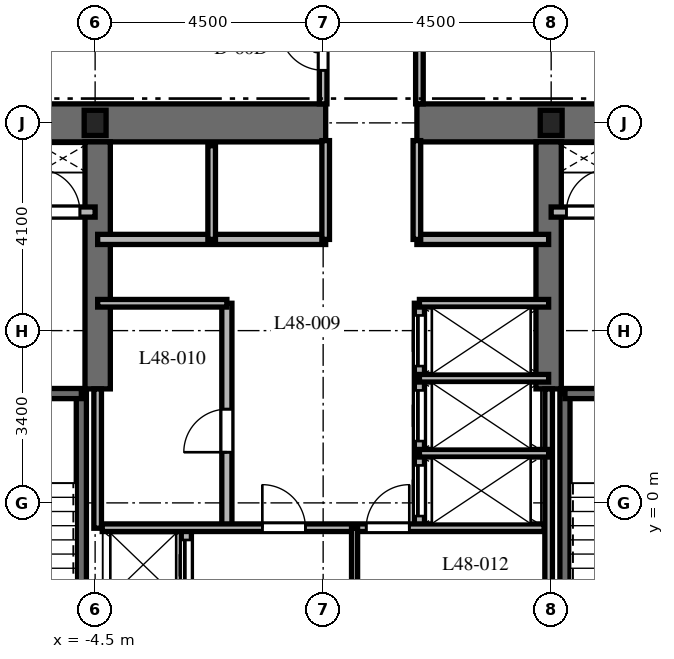
"""IFC4 building model, lengths in metres.
Left out: names, types, materials, properties, quantities, classifications, styles, units other than length and angle.
Written with IfcOpenShell. Run it as: python <this file> out.ifc"""

import sys

from ifc_helpers import new_model, si_unit, direction, frame, frame_2d, origin, origin_2d, place, context, subcontext, project, spatial, rectangle, i_section, extrude, element, fill, save


model = new_model("IFC4")
c1 = context("Model", 3, precision=1e-05, world=origin(), true_north=direction((0.0, 1.0)))
c2 = subcontext(c1, "Body", "Model", "MODEL_VIEW")
j1 = project(units=[si_unit("LENGTHUNIT", "METRE"), si_unit("PLANEANGLEUNIT", "RADIAN")], contexts=[c1])
p1 = place(None, origin())
s1 = spatial("IfcSite", under=j1, at=p1, CompositionType="ELEMENT")
p2 = place(p1, origin())
s2 = spatial("IfcBuilding", under=s1, at=p2, CompositionType="ELEMENT")
p3 = place(p2, frame((0.0, 0.0, 194.1)))
s3 = spatial("IfcBuildingStorey", under=s2, at=p3, CompositionType="ELEMENT", Elevation=194.1)
p4 = place(p3, frame((-9.375, 7.5, 0.0), z_axis=(0.0, 0.0, 1.0), x_axis=(1.0, 0.0, 0.0)))
e1 = element("IfcWall", 1, at=p4, inside=s3, PredefinedType="SHEAR", context=c2, shape_type="SweptSolid", body=[
    extrude(rectangle(XDim=9.425, YDim=0.75, at=frame_2d((4.712, 0.0))), origin(), (0.0, 0.0, 1.0), 3.7),
])
p5 = place(p3, frame((1.85, 7.5, 0.0), z_axis=(0.0, 0.0, 1.0), x_axis=(1.0, 0.0, 0.0)))
e2 = element("IfcWall", 2, at=p5, inside=s3, PredefinedType="SHEAR", context=c2, shape_type="SweptSolid", body=[
    extrude(rectangle(XDim=7.525, YDim=0.75, at=frame_2d((3.762, 0.0))), origin(), (0.0, 0.0, 1.0), 3.7),
])
for number, where, z_axis, x_axis in (
    (3, (-4.45, 2.25, 0.0), (0.0, 0.0, 1.0), (0.0, 1.0, 0.0)),
    (4, (4.45, 2.25, 0.0), (0.0, 0.0, 1.0), (0.0, 1.0, 0.0)),
):
    element("IfcWall", number, at=place(p3, frame(where, z_axis=z_axis, x_axis=x_axis)), inside=s3, PredefinedType="SHEAR", context=c2, shape_type="SweptSolid", body=[
        extrude(rectangle(XDim=4.875, YDim=0.5, at=frame_2d((2.438, 0.0))), origin(), (0.0, 0.0, 1.0), 3.7),
    ])
p6 = place(p3, frame((-4.772, -6.985, 0.0), z_axis=(0.0, 0.0, 1.0), x_axis=(0.0, 1.0, 0.0)))
e5 = element("IfcWall", 5, at=p6, inside=s3, PredefinedType="SHEAR", context=c2, shape_type="SweptSolid", body=[
    extrude(rectangle(XDim=9.143, YDim=0.2, at=frame_2d((4.572, 0.0))), origin(), (0.0, 0.0, 1.0), 3.7),
])
p7 = place(p3, frame((-8.458, 2.158, 0.0), z_axis=(0.0, 0.0, 1.0), x_axis=(1.0, 0.0, 0.0)))
e6 = element("IfcWall", 6, at=p7, inside=s3, PredefinedType="SHEAR", context=c2, shape_type="SweptSolid", body=[
    extrude(rectangle(XDim=3.686, YDim=0.2, at=frame_2d((1.843, 0.0))), origin(), (0.0, 0.0, 1.0), 3.7),
])
p8 = place(p7, frame((1.3, 0.0, 0.0)))
e7 = element("IfcOpeningElement", 7, at=p8, cuts=e6, PredefinedType="OPENING", context=c2, shape_type="SweptSolid", body=[
    extrude(rectangle(XDim=1.0, YDim=2.15, at=frame_2d((0.5, 1.075))), frame((0.0, 0.11, 0.0), z_axis=(0.0, -1.0, 0.0), x_axis=(1.0, 0.0, 0.0)), (0.0, 0.0, 1.0), 0.22),
])
p9 = place(p3, frame((4.772, -6.985, 0.0), z_axis=(0.0, 0.0, 1.0), x_axis=(0.0, 1.0, 0.0)))
e8 = element("IfcWall", 8, at=p9, inside=s3, PredefinedType="SHEAR", context=c2, shape_type="SweptSolid", body=[
    extrude(rectangle(XDim=9.143, YDim=0.2, at=frame_2d((4.572, 0.0))), origin(), (0.0, 0.0, 1.0), 3.7),
])
p10 = place(p3, frame((4.772, 2.158, 0.0), z_axis=(0.0, 0.0, 1.0), x_axis=(1.0, 0.0, 0.0)))
e9 = element("IfcWall", 9, at=p10, inside=s3, PredefinedType="SHEAR", context=c2, shape_type="SweptSolid", body=[
    extrude(rectangle(XDim=3.686, YDim=0.2, at=frame_2d((1.843, 0.0))), origin(), (0.0, 0.0, 1.0), 3.7),
])
p11 = place(p10, frame((1.35, 0.0, 0.0)))
e10 = element("IfcOpeningElement", 10, at=p11, cuts=e9, PredefinedType="OPENING", context=c2, shape_type="SweptSolid", body=[
    extrude(rectangle(XDim=1.0, YDim=2.15, at=frame_2d((0.5, 1.075))), frame((0.0, 0.11, 0.0), z_axis=(0.0, -1.0, 0.0), x_axis=(1.0, 0.0, 0.0)), (0.0, 0.0, 1.0), 0.22),
])
for number, where, z_axis, x_axis in (
    (11, (4.5, 7.5, 0.0), (0.0, 0.0, 1.0), (1.0, 0.0, 0.0)),
    (12, (-4.5, 7.5, 0.0), (0.0, 0.0, 1.0), (1.0, 0.0, 0.0)),
):
    element("IfcColumn", number, at=place(p3, frame(where, z_axis=z_axis, x_axis=x_axis)), inside=s3, PredefinedType="COLUMN", context=c2, shape_type="SweptSolid", body=[
        extrude(i_section(OverallWidth=0.432, OverallDepth=0.498, WebThickness=0.056, FlangeThickness=0.089, at=origin_2d()), origin(), (0.0, 0.0, 1.0), 3.7),
    ])
p12 = place(p3, frame((-8.55, 5.74, 0.0), z_axis=(0.0, 0.0, 1.0), x_axis=(1.0, 0.0, 0.0)))
e13 = element("IfcWall", 13, at=p12, inside=s3, PredefinedType="PARTITIONING", context=c2, shape_type="SweptSolid", body=[
    extrude(rectangle(XDim=4.05, YDim=0.2, at=frame_2d((2.025, 0.0))), origin(), (0.0, 0.0, 1.0), 3.4),
])
p13 = place(p12, frame((0.75, 0.0, 0.0)))
e14 = element("IfcOpeningElement", 14, at=p13, cuts=e13, PredefinedType="OPENING", context=c2, shape_type="SweptSolid", body=[
    extrude(rectangle(XDim=1.1, YDim=2.2, at=frame_2d((0.55, 1.1))), frame((0.0, 0.11, 0.0), z_axis=(0.0, -1.0, 0.0), x_axis=(1.0, 0.0, 0.0)), (0.0, 0.0, 1.0), 0.22),
])
p14 = place(p12, frame((2.9, 0.0, 0.0)))
e15 = element("IfcOpeningElement", 15, at=p14, cuts=e13, PredefinedType="OPENING", context=c2, shape_type="SweptSolid", body=[
    extrude(rectangle(XDim=0.85, YDim=2.03, at=frame_2d((0.425, 1.015))), frame((0.0, 0.11, 0.0), z_axis=(0.0, -1.0, 0.0), x_axis=(1.0, 0.0, 0.0)), (0.0, 0.0, 1.0), 0.22),
])
p15 = place(p3, frame((4.5, 5.74, 0.0), z_axis=(0.0, 0.0, 1.0), x_axis=(1.0, 0.0, 0.0)))
e16 = element("IfcWall", 16, at=p15, inside=s3, PredefinedType="PARTITIONING", context=c2, shape_type="SweptSolid", body=[
    extrude(rectangle(XDim=4.05, YDim=0.2, at=frame_2d((2.025, 0.0))), origin(), (0.0, 0.0, 1.0), 3.4),
])
p16 = place(p15, frame((0.3, 0.0, 0.0)))
e17 = element("IfcOpeningElement", 17, at=p16, cuts=e16, PredefinedType="OPENING", context=c2, shape_type="SweptSolid", body=[
    extrude(rectangle(XDim=0.85, YDim=2.03, at=frame_2d((0.425, 1.015))), frame((0.0, 0.11, 0.0), z_axis=(0.0, -1.0, 0.0), x_axis=(1.0, 0.0, 0.0)), (0.0, 0.0, 1.0), 0.22),
])
p17 = place(p15, frame((2.15, 0.0, 0.0)))
e18 = element("IfcOpeningElement", 18, at=p17, cuts=e16, PredefinedType="OPENING", context=c2, shape_type="SweptSolid", body=[
    extrude(rectangle(XDim=1.1, YDim=2.2, at=frame_2d((0.55, 1.1))), frame((0.0, 0.11, 0.0), z_axis=(0.0, -1.0, 0.0), x_axis=(1.0, 0.0, 0.0)), (0.0, 0.0, 1.0), 0.22),
])
p18 = place(p3, frame((-2.7, -1.972, 0.0), z_axis=(0.0, 0.0, 1.0), x_axis=(0.0, 1.0, 0.0)))
e19 = element("IfcWall", 19, at=p18, inside=s3, PredefinedType="PARTITIONING", context=c2, shape_type="SweptSolid", body=[
    extrude(rectangle(XDim=1.472, YDim=0.2, at=frame_2d((0.736, 0.0))), origin(), (0.0, 0.0, 1.0), 3.4),
])
p19 = place(p18, frame((0.24, 0.0, 0.0)))
e20 = element("IfcOpeningElement", 20, at=p19, cuts=e19, PredefinedType="OPENING", context=c2, shape_type="SweptSolid", body=[
    extrude(rectangle(XDim=1.0, YDim=2.2, at=frame_2d((0.5, 1.1))), frame((0.0, 0.11, 0.0), z_axis=(0.0, -1.0, 0.0), x_axis=(1.0, 0.0, 0.0)), (0.0, 0.0, 1.0), 0.22),
])
p20 = place(p3, frame((-4.45, 5.2, 0.0), z_axis=(0.0, 0.0, 1.0), x_axis=(1.0, 0.0, 0.0)))
e21 = element("IfcWall", 21, at=p20, inside=s3, PredefinedType="PARTITIONING", context=c2, shape_type="SweptSolid", body=[
    extrude(rectangle(XDim=4.5, YDim=0.2, at=frame_2d((2.25, 0.0))), origin(), (0.0, 0.0, 1.0), 3.4),
])
p21 = place(p3, frame((1.85, 5.2, 0.0), z_axis=(0.0, 0.0, 1.0), x_axis=(1.0, 0.0, 0.0)))
e22 = element("IfcWall", 22, at=p21, inside=s3, PredefinedType="PARTITIONING", context=c2, shape_type="SweptSolid", body=[
    extrude(rectangle(XDim=2.6, YDim=0.2, at=frame_2d((1.3, 0.0))), origin(), (0.0, 0.0, 1.0), 3.4),
])
p22 = place(p3, frame((-2.2, 5.2, 0.0), z_axis=(0.0, 0.0, 1.0), x_axis=(0.0, 1.0, 0.0)))
e23 = element("IfcWall", 23, at=p22, inside=s3, PredefinedType="PARTITIONING", context=c2, shape_type="SweptSolid", body=[
    extrude(rectangle(XDim=1.85, YDim=0.15, at=frame_2d((0.925, 0.0))), origin(), (0.0, 0.0, 1.0), 3.4),
])
for number, where, z_axis, x_axis in (
    (24, (0.05, 5.2, 0.0), (0.0, 0.0, 1.0), (0.0, 1.0, 0.0)),
    (25, (1.85, 5.2, 0.0), (0.0, 0.0, 1.0), (0.0, 1.0, 0.0)),
):
    element("IfcWall", number, at=place(p3, frame(where, z_axis=z_axis, x_axis=x_axis)), inside=s3, PredefinedType="PARTITIONING", context=c2, shape_type="SweptSolid", body=[
        extrude(rectangle(XDim=1.95, YDim=0.15, at=frame_2d((0.975, 0.0))), origin(), (0.0, 0.0, 1.0), 3.4),
    ])
p23 = place(p3, frame((-4.45, -0.5, 0.0), z_axis=(0.0, 0.0, 1.0), x_axis=(0.0, 1.0, 0.0)))
e26 = element("IfcWall", 26, at=p23, inside=s3, PredefinedType="PARTITIONING", context=c2, shape_type="SweptSolid", body=[
    extrude(rectangle(XDim=2.75, YDim=0.15, at=frame_2d((1.375, 0.0))), origin(), (0.0, 0.0, 1.0), 3.4),
])
p24 = place(p3, frame((4.45, -1.972, 0.0), z_axis=(0.0, 0.0, 1.0), x_axis=(0.0, 1.0, 0.0)))
e27 = element("IfcWall", 27, at=p24, inside=s3, PredefinedType="PARTITIONING", context=c2, shape_type="SweptSolid", body=[
    extrude(rectangle(XDim=4.222, YDim=0.15, at=frame_2d((2.111, 0.0))), origin(), (0.0, 0.0, 1.0), 3.4),
])
p25 = place(p3, frame((-1.9, -0.5, 0.0), z_axis=(0.0, 0.0, 1.0), x_axis=(0.0, 1.0, 0.0)))
e28 = element("IfcWall", 28, at=p25, inside=s3, PredefinedType="PARTITIONING", context=c2, shape_type="SweptSolid", body=[
    extrude(rectangle(XDim=4.44, YDim=0.2, at=frame_2d((2.22, 0.0))), origin(), (0.0, 0.0, 1.0), 3.4),
])
p26 = place(p25, frame((1.5, 0.0, 0.0)))
e29 = element("IfcOpeningElement", 29, at=p26, cuts=e28, PredefinedType="OPENING", context=c2, shape_type="SweptSolid", body=[
    extrude(rectangle(XDim=0.85, YDim=2.03, at=frame_2d((0.425, 1.015))), frame((0.0, 0.11, 0.0), z_axis=(0.0, -1.0, 0.0), x_axis=(1.0, 0.0, 0.0)), (0.0, 0.0, 1.0), 0.22),
])
p27 = place(p3, frame((-4.45, 3.94, 0.0), z_axis=(0.0, 0.0, 1.0), x_axis=(1.0, 0.0, 0.0)))
e30 = element("IfcWall", 30, at=p27, inside=s3, PredefinedType="PARTITIONING", context=c2, shape_type="SweptSolid", body=[
    extrude(rectangle(XDim=2.55, YDim=0.15, at=frame_2d((1.275, 0.0))), origin(), (0.0, 0.0, 1.0), 3.4),
])
p28 = place(p3, frame((1.9, -0.5, 0.0), z_axis=(0.0, 0.0, 1.0), x_axis=(0.0, 1.0, 0.0)))
e31 = element("IfcWall", 31, at=p28, inside=s3, PredefinedType="PARTITIONING", context=c2, shape_type="SweptSolid", body=[
    extrude(rectangle(XDim=4.44, YDim=0.2, at=frame_2d((2.22, 0.0))), origin(), (0.0, 0.0, 1.0), 3.4),
])
p29 = place(p28, frame((0.24, 0.0, 0.0)))
e32 = element("IfcOpeningElement", 32, at=p29, cuts=e31, PredefinedType="OPENING", context=c2, shape_type="SweptSolid", body=[
    extrude(rectangle(XDim=1.0, YDim=2.2, at=frame_2d((0.5, 1.1))), frame((0.0, 0.11, 0.0), z_axis=(0.0, -1.0, 0.0), x_axis=(1.0, 0.0, 0.0)), (0.0, 0.0, 1.0), 0.22),
])
p30 = place(p28, frame((1.72, 0.0, 0.0)))
e33 = element("IfcOpeningElement", 33, at=p30, cuts=e31, PredefinedType="OPENING", context=c2, shape_type="SweptSolid", body=[
    extrude(rectangle(XDim=1.0, YDim=2.2, at=frame_2d((0.5, 1.1))), frame((0.0, 0.11, 0.0), z_axis=(0.0, -1.0, 0.0), x_axis=(1.0, 0.0, 0.0)), (0.0, 0.0, 1.0), 0.22),
])
p31 = place(p28, frame((3.2, 0.0, 0.0)))
e34 = element("IfcOpeningElement", 34, at=p31, cuts=e31, PredefinedType="OPENING", context=c2, shape_type="SweptSolid", body=[
    extrude(rectangle(XDim=1.0, YDim=2.2, at=frame_2d((0.5, 1.1))), frame((0.0, 0.11, 0.0), z_axis=(0.0, -1.0, 0.0), x_axis=(1.0, 0.0, 0.0)), (0.0, 0.0, 1.0), 0.22),
])
for number, where, z_axis, x_axis in (
    (35, (1.9, 3.94, 0.0), (0.0, 0.0, 1.0), (1.0, 0.0, 0.0)),
    (36, (1.9, 0.98, 0.0), (0.0, 0.0, 1.0), (1.0, 0.0, 0.0)),
    (37, (1.9, 2.46, 0.0), (0.0, 0.0, 1.0), (1.0, 0.0, 0.0)),
):
    element("IfcWall", number, at=place(p3, frame(where, z_axis=z_axis, x_axis=x_axis)), inside=s3, PredefinedType="PARTITIONING", context=c2, shape_type="SweptSolid", body=[
        extrude(rectangle(XDim=2.55, YDim=0.15, at=frame_2d((1.275, 0.0))), origin(), (0.0, 0.0, 1.0), 3.4),
    ])
p32 = place(p3, frame((-4.36, -0.49, 0.0), z_axis=(0.0, 0.0, 1.0), x_axis=(1.0, 0.0, 0.0)))
e38 = element("IfcWall", 38, at=p32, inside=s3, PredefinedType="PARTITIONING", context=c2, shape_type="SweptSolid", body=[
    extrude(rectangle(XDim=8.72, YDim=0.15, at=frame_2d((4.36, 0.0))), origin(), (0.0, 0.0, 1.0), 3.4),
])
p33 = place(p32, frame((3.16, 0.0, 0.0)))
e39 = element("IfcOpeningElement", 39, at=p33, cuts=e38, PredefinedType="OPENING", context=c2, shape_type="SweptSolid", body=[
    extrude(rectangle(XDim=0.85, YDim=2.03, at=frame_2d((0.425, 1.015))), frame((0.0, 0.085, 0.0), z_axis=(0.0, -1.0, 0.0), x_axis=(1.0, 0.0, 0.0)), (0.0, 0.0, 1.0), 0.17),
])
p34 = place(p32, frame((5.21, 0.0, 0.0)))
e40 = element("IfcOpeningElement", 40, at=p34, cuts=e38, PredefinedType="OPENING", context=c2, shape_type="SweptSolid", body=[
    extrude(rectangle(XDim=0.85, YDim=2.03, at=frame_2d((0.425, 1.015))), frame((0.0, 0.085, 0.0), z_axis=(0.0, -1.0, 0.0), x_axis=(1.0, 0.0, 0.0)), (0.0, 0.0, 1.0), 0.17),
])
p35 = place(p3, frame((0.62, -1.972, 0.0), z_axis=(0.0, 0.0, 1.0), x_axis=(0.0, 1.0, 0.0)))
e41 = element("IfcWall", 41, at=p35, inside=s3, PredefinedType="PARTITIONING", context=c2, shape_type="SweptSolid", body=[
    extrude(rectangle(XDim=1.472, YDim=0.12, at=frame_2d((0.736, 0.0))), origin(), (0.0, 0.0, 1.0), 3.4),
])
p36 = place(p3, frame((1.9, 10.05, 0.0), z_axis=(0.0, 0.0, 1.0), x_axis=(0.0, -1.0, 0.0)))
e42 = element("IfcWall", 42, at=p36, inside=s3, PredefinedType="PARTITIONING", context=c2, shape_type="SweptSolid", body=[
    extrude(rectangle(XDim=2.175, YDim=0.15, at=frame_2d((1.087, 0.0))), origin(), (0.0, 0.0, 1.0), 3.4),
])
p37 = place(p3, frame((0.0, 7.875, 0.0), z_axis=(0.0, 0.0, 1.0), x_axis=(0.0, 1.0, 0.0)))
e43 = element("IfcWall", 43, at=p37, inside=s3, PredefinedType="PARTITIONING", context=c2, shape_type="SweptSolid", body=[
    extrude(rectangle(XDim=2.175, YDim=0.15, at=frame_2d((1.087, 0.0))), origin(), (0.0, 0.0, 1.0), 3.4),
])
p38 = place(p37, frame((0.663, 0.0, 0.0)))
e44 = element("IfcOpeningElement", 44, at=p38, cuts=e43, PredefinedType="OPENING", context=c2, shape_type="SweptSolid", body=[
    extrude(rectangle(XDim=0.85, YDim=2.03, at=frame_2d((0.425, 1.015))), frame((0.0, 0.085, 0.0), z_axis=(0.0, -1.0, 0.0), x_axis=(1.0, 0.0, 0.0)), (0.0, 0.0, 1.0), 0.17),
])
p39 = place(p14, origin())
e45 = element("IfcDoor", 45, at=p39, inside=s3, OperationType="SINGLE_SWING_LEFT", PredefinedType="DOOR", context=c2, shape_type="SweptSolid", body=[
    extrude(rectangle(XDim=0.85, YDim=2.03, at=frame_2d((0.425, 1.015))), frame((0.0, 0.025, 0.0), z_axis=(0.0, -1.0, 0.0), x_axis=(1.0, 0.0, 0.0)), (0.0, 0.0, 1.0), 0.05),
])
fill(e15, e45)
p40 = place(p16, origin())
e46 = element("IfcDoor", 46, at=p40, inside=s3, OperationType="SINGLE_SWING_RIGHT", PredefinedType="DOOR", context=c2, shape_type="SweptSolid", body=[
    extrude(rectangle(XDim=0.85, YDim=2.03, at=frame_2d((0.425, 1.015))), frame((0.0, 0.025, 0.0), z_axis=(0.0, -1.0, 0.0), x_axis=(1.0, 0.0, 0.0)), (0.0, 0.0, 1.0), 0.05),
])
fill(e17, e46)
p41 = place(p19, origin())
e47 = element("IfcDoor", 47, at=p41, inside=s3, OperationType="SLIDING_TO_LEFT", PredefinedType="DOOR", context=c2, shape_type="SweptSolid", body=[
    extrude(rectangle(XDim=1.0, YDim=2.2, at=frame_2d((0.5, 1.1))), frame((0.0, 0.025, 0.0), z_axis=(0.0, -1.0, 0.0), x_axis=(1.0, 0.0, 0.0)), (0.0, 0.0, 1.0), 0.05),
])
fill(e20, e47)
p42 = place(p26, origin())
e48 = element("IfcDoor", 48, at=p42, inside=s3, OperationType="SINGLE_SWING_LEFT", PredefinedType="DOOR", context=c2, shape_type="SweptSolid", body=[
    extrude(rectangle(XDim=0.85, YDim=2.03, at=frame_2d((0.425, 1.015))), frame((0.0, 0.025, 0.0), z_axis=(0.0, -1.0, 0.0), x_axis=(1.0, 0.0, 0.0)), (0.0, 0.0, 1.0), 0.05),
])
fill(e29, e48)
p43 = place(p29, origin())
e49 = element("IfcDoor", 49, at=p43, inside=s3, OperationType="SLIDING_TO_RIGHT", PredefinedType="DOOR", context=c2, shape_type="SweptSolid", body=[
    extrude(rectangle(XDim=1.0, YDim=2.2, at=frame_2d((0.5, 1.1))), frame((0.0, 0.025, 0.0), z_axis=(0.0, -1.0, 0.0), x_axis=(1.0, 0.0, 0.0)), (0.0, 0.0, 1.0), 0.05),
])
fill(e32, e49)
p44 = place(p30, origin())
e50 = element("IfcDoor", 50, at=p44, inside=s3, OperationType="SLIDING_TO_RIGHT", PredefinedType="DOOR", context=c2, shape_type="SweptSolid", body=[
    extrude(rectangle(XDim=1.0, YDim=2.2, at=frame_2d((0.5, 1.1))), frame((0.0, 0.025, 0.0), z_axis=(0.0, -1.0, 0.0), x_axis=(1.0, 0.0, 0.0)), (0.0, 0.0, 1.0), 0.05),
])
fill(e33, e50)
p45 = place(p31, origin())
e51 = element("IfcDoor", 51, at=p45, inside=s3, OperationType="SLIDING_TO_RIGHT", PredefinedType="DOOR", context=c2, shape_type="SweptSolid", body=[
    extrude(rectangle(XDim=1.0, YDim=2.2, at=frame_2d((0.5, 1.1))), frame((0.0, 0.025, 0.0), z_axis=(0.0, -1.0, 0.0), x_axis=(1.0, 0.0, 0.0)), (0.0, 0.0, 1.0), 0.05),
])
fill(e34, e51)
p46 = place(p33, origin())
e52 = element("IfcDoor", 52, at=p46, inside=s3, OperationType="SINGLE_SWING_LEFT", PredefinedType="DOOR", context=c2, shape_type="SweptSolid", body=[
    extrude(rectangle(XDim=0.85, YDim=2.03, at=frame_2d((0.425, 1.015))), frame((0.0, 0.025, 0.0), z_axis=(0.0, -1.0, 0.0), x_axis=(1.0, 0.0, 0.0)), (0.0, 0.0, 1.0), 0.05),
])
fill(e39, e52)
p47 = place(p34, origin())
e53 = element("IfcDoor", 53, at=p47, inside=s3, OperationType="SINGLE_SWING_RIGHT", PredefinedType="DOOR", context=c2, shape_type="SweptSolid", body=[
    extrude(rectangle(XDim=0.85, YDim=2.03, at=frame_2d((0.425, 1.015))), frame((0.0, 0.025, 0.0), z_axis=(0.0, -1.0, 0.0), x_axis=(1.0, 0.0, 0.0)), (0.0, 0.0, 1.0), 0.05),
])
fill(e40, e53)
p48 = place(p38, origin())
e54 = element("IfcDoor", 54, at=p48, inside=s3, OperationType="SINGLE_SWING_RIGHT", PredefinedType="DOOR", context=c2, shape_type="SweptSolid", body=[
    extrude(rectangle(XDim=0.85, YDim=2.03, at=frame_2d((0.425, 1.015))), frame((0.0, 0.025, 0.0), z_axis=(0.0, -1.0, 0.0), x_axis=(1.0, 0.0, 0.0)), (0.0, 0.0, 1.0), 0.05),
])
fill(e44, e54)
save(model, sys.argv[1])
